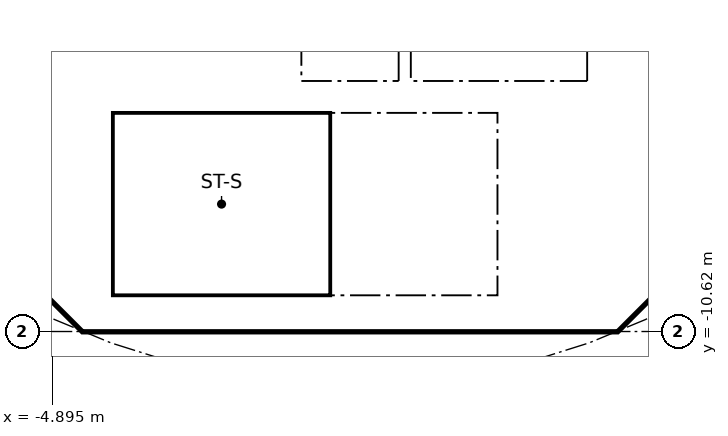
"""IFC4 building model, lengths in metres.
Left out: names, types, materials, properties, quantities, classifications, styles, units other than length and angle.
Written with IfcOpenShell. Run it as: python <this file> out.ifc"""

import sys

from ifc_helpers import new_model, si_unit, direction, frame, frame_2d, origin, place, context, subcontext, project, spatial, polyline, rectangle, outline, extrude, element, fill, save


model = new_model("IFC4")
c1 = context("Model", 3, precision=1e-05, world=origin(), true_north=direction((0.0, 1.0)))
c2 = subcontext(c1, "Body", "Model", "MODEL_VIEW")
j1 = project(units=[si_unit("LENGTHUNIT", "METRE"), si_unit("PLANEANGLEUNIT", "RADIAN")], contexts=[c1])
p1 = place(None, origin())
s1 = spatial("IfcSite", under=j1, at=p1, CompositionType="ELEMENT")
p2 = place(p1, origin())
s2 = spatial("IfcBuilding", under=s1, at=p2, CompositionType="ELEMENT")
p3 = place(p2, frame((0.0, 0.0, 191.8)))
s3 = spatial("IfcBuildingStorey", under=s2, at=p3, CompositionType="ELEMENT", Elevation=191.8)
p4 = place(p3, frame((-9.988, -4.613, 0.0), z_axis=(0.0, 0.0, 1.0), x_axis=(0.707106781187, -0.707106781187, 0.0)))
e1 = element("IfcWall", 1, at=p4, inside=s3, PredefinedType="SHEAR", context=c2, shape_type="SweptSolid", body=[
    extrude(rectangle(XDim=7.602, YDim=0.6, at=frame_2d((3.801, 0.0))), origin(), (0.0, 0.0, 1.0), 3.44),
])
p5 = place(p4, frame((6.151, 0.0, 0.0)))
e2 = element("IfcOpeningElement", 2, at=p5, cuts=e1, PredefinedType="OPENING", context=c2, shape_type="SweptSolid", body=[
    extrude(rectangle(XDim=1.1, YDim=2.1, at=frame_2d((0.55, 1.05))), frame((0.0, 0.31, 0.0), z_axis=(0.0, -1.0, 0.0), x_axis=(1.0, 0.0, 0.0)), (0.0, 0.0, 1.0), 0.62),
])
p6 = place(p3, frame((4.613, -9.988, 0.0), z_axis=(0.0, 0.0, 1.0), x_axis=(0.707106781187, 0.707106781187, 0.0)))
e3 = element("IfcWall", 3, at=p6, inside=s3, PredefinedType="SHEAR", context=c2, shape_type="SweptSolid", body=[
    extrude(rectangle(XDim=7.602, YDim=0.6, at=frame_2d((3.801, 0.0))), origin(), (0.0, 0.0, 1.0), 3.44),
])
p7 = place(p6, frame((3.201, 0.0, 0.0)))
e4 = element("IfcOpeningElement", 4, at=p7, cuts=e3, PredefinedType="OPENING", context=c2, shape_type="SweptSolid", body=[
    extrude(rectangle(XDim=1.2, YDim=2.1, at=frame_2d((0.6, 1.05))), frame((0.0, 0.31, 0.0), z_axis=(0.0, -1.0, 0.0), x_axis=(1.0, 0.0, 0.0)), (0.0, 0.0, 1.0), 0.62),
])
p8 = place(p3, frame((4.0, -10.025, 0.0), z_axis=(0.0, 0.0, 1.0), x_axis=(0.0, 1.0, 0.0)))
e5 = element("IfcWall", 5, at=p8, inside=s3, PredefinedType="SOLIDWALL", context=c2, shape_type="SweptSolid", body=[
    extrude(rectangle(XDim=3.0, YDim=0.2, at=frame_2d((1.5, 0.0))), origin(), (0.0, 0.0, 1.0), 3.44),
])
p9 = place(p8, frame((0.975, 0.0, 0.0)))
e6 = element("IfcOpeningElement", 6, at=p9, cuts=e5, PredefinedType="OPENING", context=c2, shape_type="SweptSolid", body=[
    extrude(rectangle(XDim=1.1, YDim=2.1, at=frame_2d((0.55, 1.05))), frame((0.0, 0.11, 0.0), z_axis=(0.0, -1.0, 0.0), x_axis=(1.0, 0.0, 0.0)), (0.0, 0.0, 1.0), 0.22),
])
p10 = place(p3, frame((4.0, -6.5, 0.0), z_axis=(0.0, 0.0, 1.0), x_axis=(0.0, 1.0, 0.0)))
e7 = element("IfcWall", 7, at=p10, inside=s3, PredefinedType="SOLIDWALL", context=c2, shape_type="SweptSolid", body=[
    extrude(rectangle(XDim=2.2, YDim=0.2, at=frame_2d((1.1, 0.0))), origin(), (0.0, 0.0, 1.0), 3.44),
])
p11 = place(p10, frame((0.55, 0.0, 0.0)))
e8 = element("IfcOpeningElement", 8, at=p11, cuts=e7, PredefinedType="OPENING", context=c2, shape_type="SweptSolid", body=[
    extrude(rectangle(XDim=1.1, YDim=2.1, at=frame_2d((0.55, 1.05))), frame((0.0, 0.11, 0.0), z_axis=(0.0, -1.0, 0.0), x_axis=(1.0, 0.0, 0.0)), (0.0, 0.0, 1.0), 0.22),
])
p12 = place(p3, frame((-4.0, -6.5, 0.0), z_axis=(0.0, 0.0, 1.0), x_axis=(0.0, 1.0, 0.0)))
e9 = element("IfcWall", 9, at=p12, inside=s3, PredefinedType="SOLIDWALL", context=c2, shape_type="SweptSolid", body=[
    extrude(rectangle(XDim=2.2, YDim=0.2, at=frame_2d((1.1, 0.0))), origin(), (0.0, 0.0, 1.0), 3.44),
])
p13 = place(p12, frame((0.65, 0.0, 0.0)))
e10 = element("IfcOpeningElement", 10, at=p13, cuts=e9, PredefinedType="OPENING", context=c2, shape_type="SweptSolid", body=[
    extrude(rectangle(XDim=0.9, YDim=2.1, at=frame_2d((0.45, 1.05))), frame((0.0, 0.11, 0.0), z_axis=(0.0, -1.0, 0.0), x_axis=(1.0, 0.0, 0.0)), (0.0, 0.0, 1.0), 0.22),
])
p14 = place(p3, origin())
e11 = element("IfcWall", 11, at=p14, inside=s3, PredefinedType="SHEAR", context=c2, shape_type="SweptSolid", body=[
    extrude(outline(polyline([(-4.152, -10.025), (4.152, -10.025), (4.401, -9.776), (4.825, -10.2), (4.401, -10.625), (-4.401, -10.625), (-4.825, -10.2), (-4.401, -9.776), (-4.152, -10.025)])), origin(), (0.0, 0.0, 1.0), 3.44),
])
for number, where, z_axis, x_axis in (
    (12, (-0.9, -6.5, 0.0), (0.0, 0.0, 1.0), (0.0, 1.0, 0.0)),
    (13, (0.9, -6.5, 0.0), (0.0, 0.0, 1.0), (0.0, 1.0, 0.0)),
):
    element("IfcWall", number, at=place(p3, frame(where, z_axis=z_axis, x_axis=x_axis)), inside=s3, PredefinedType="SOLIDWALL", context=c2, shape_type="SweptSolid", body=[
        extrude(rectangle(XDim=2.2, YDim=0.2, at=frame_2d((1.1, 0.0))), origin(), (0.0, 0.0, 1.0), 3.44),
    ])
p15 = place(p3, origin())
e14 = element("IfcWall", 14, at=p15, inside=s3, PredefinedType="SOLIDWALL", context=c2, shape_type="SweptSolid", body=[
    extrude(outline(polyline([(-3.9, -10.025), (-4.1, -10.025), (-4.1, -7.025), (-3.9, -7.025), (-3.9, -10.025)])), origin(), (0.0, 0.0, 1.0), 3.44),
])
p16 = place(p3, origin())
e15 = element("IfcWall", 15, at=p16, inside=s3, PredefinedType="SOLIDWALL", context=c2, shape_type="SweptSolid", body=[
    extrude(outline(polyline([(4.1, -7.025), (-4.1, -7.025), (-4.1, -6.5), (4.1, -6.5), (4.1, -7.025)])), origin(), (0.0, 0.0, 1.0), 3.44),
])
p17 = place(p9, origin())
e16 = element("IfcDoor", 16, at=p17, inside=s3, OperationType="SINGLE_SWING_RIGHT", PredefinedType="DOOR", context=c2, shape_type="SweptSolid", body=[
    extrude(rectangle(XDim=1.1, YDim=2.1, at=frame_2d((0.55, 1.05))), frame((0.0, 0.025, 0.0), z_axis=(0.0, -1.0, 0.0), x_axis=(1.0, 0.0, 0.0)), (0.0, 0.0, 1.0), 0.05),
])
fill(e6, e16)
p18 = place(p5, origin())
e17 = element("IfcDoor", 17, at=p18, inside=s3, OperationType="SINGLE_SWING_RIGHT", PredefinedType="DOOR", context=c2, shape_type="SweptSolid", body=[
    extrude(rectangle(XDim=1.1, YDim=2.1, at=frame_2d((0.55, 1.05))), frame((0.0, 0.025, 0.0), z_axis=(0.0, -1.0, 0.0), x_axis=(1.0, 0.0, 0.0)), (0.0, 0.0, 1.0), 0.05),
])
fill(e2, e17)
save(model, sys.argv[1])
